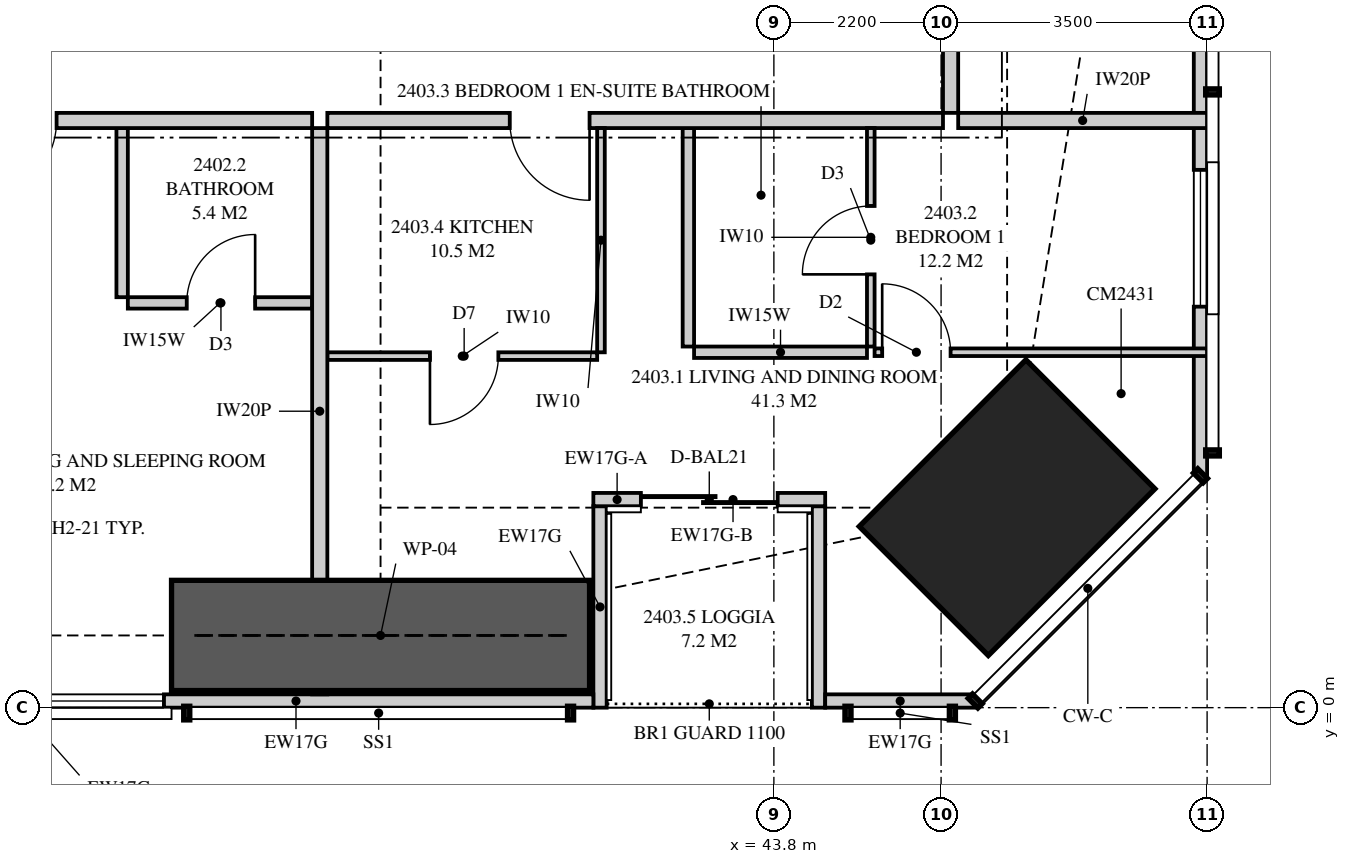
"""IFC4 building model, lengths in metres.
Left out: names, types, materials, properties, quantities, classifications, styles, units other than length and angle.
Written with IfcOpenShell. Run it as: python <this file> out.ifc"""

import sys

from ifc_helpers import new_model, si_unit, direction, frame, frame_2d, origin, origin_2d, place, context, subcontext, project, spatial, polyline, rectangle, outline, extrude, element, fill, save


model = new_model("IFC4")
c1 = context("Model", 3, precision=1e-05, world=origin(), true_north=direction((0.0, 1.0)))
c2 = subcontext(c1, "Body", "Model", "MODEL_VIEW")
j1 = project(units=[si_unit("LENGTHUNIT", "METRE"), si_unit("PLANEANGLEUNIT", "RADIAN")], contexts=[c1])
p1 = place(None, origin())
s1 = spatial("IfcSite", under=j1, at=p1, CompositionType="ELEMENT")
p2 = place(p1, origin())
s2 = spatial("IfcBuilding", under=s1, at=p2, CompositionType="ELEMENT")
p3 = place(p2, frame((0.0, 0.0, 91.45)))
s3 = spatial("IfcBuildingStorey", under=s2, at=p3, CompositionType="ELEMENT", Elevation=91.45)
p4 = place(p3, frame((46.869, 2.631, 0.0), z_axis=(0.0, 0.0, 1.0), x_axis=(-0.707106781187, 0.707106781187, 0.0)))
e1 = element("IfcColumn", 1, at=p4, inside=s3, PredefinedType="COLUMN", context=c2, shape_type="SweptSolid", body=[
    extrude(rectangle(XDim=2.4, YDim=3.1, at=origin_2d()), origin(), (0.0, 0.0, 1.0), 3.35),
])
p5 = place(p3, frame((33.6, 0.087, 0.0), z_axis=(0.0, 0.0, 1.0), x_axis=(1.0, 0.0, 0.0)))
e2 = element("IfcWall", 2, at=p5, inside=s3, PredefinedType="SOLIDWALL", context=c2, shape_type="SweptSolid", body=[
    extrude(outline(polyline([(0.0, 0.0), (7.825, 0.0), (7.825, 3.11), (5.228, 3.11), (5.228, 2.15), (5.183, 2.15), (5.183, 3.11), (5.025, 3.11), (5.025, 2.15), (0.0, 2.15), (0.0, 0.0)])), frame((0.0, 0.087, 0.0), z_axis=(0.0, -1.0, 0.0), x_axis=(1.0, 0.0, 0.0)), (0.0, 0.0, 1.0), 0.175),
])
p6 = place(p5, frame((0.375, 0.0, 0.4)))
e3 = element("IfcOpeningElement", 3, at=p6, cuts=e2, PredefinedType="OPENING", context=c2, shape_type="SweptSolid", body=[
    extrude(rectangle(XDim=1.8, YDim=1.7, at=frame_2d((0.9, 0.85))), frame((0.0, 0.097, 0.0), z_axis=(0.0, -1.0, 0.0), x_axis=(1.0, 0.0, 0.0)), (0.0, 0.0, 1.0), 0.195),
])
p7 = place(p3, frame((44.475, 0.087, 0.0), z_axis=(0.0, 0.0, 1.0), x_axis=(1.0, 0.0, 0.0)))
e4 = element("IfcWall", 4, at=p7, inside=s3, PredefinedType="SOLIDWALL", context=c2, shape_type="SweptSolid", body=[
    extrude(rectangle(XDim=1.974, YDim=0.175, at=frame_2d((0.987, 0.0))), origin(), (0.0, 0.0, 1.0), 3.11),
])
p8 = place(p3, frame((41.425, 2.738, 0.0), z_axis=(0.0, 0.0, 1.0), x_axis=(1.0, 0.0, 0.0)))
e5 = element("IfcWall", 5, at=p8, inside=s3, PredefinedType="SOLIDWALL", context=c2, shape_type="SweptSolid", body=[
    extrude(rectangle(XDim=0.625, YDim=0.175, at=frame_2d((0.312, 0.0))), origin(), (0.0, 0.0, 1.0), 2.51),
])
p9 = place(p3, frame((42.05, 2.738, 0.0), z_axis=(0.0, 0.0, 1.0), x_axis=(1.0, 0.0, 0.0)))
e6 = element("IfcWall", 6, at=p9, inside=s3, PredefinedType="SOLIDWALL", context=c2, shape_type="SweptSolid", body=[
    extrude(rectangle(XDim=2.425, YDim=0.175, at=frame_2d((1.212, 0.0))), origin(), (0.0, 0.0, 1.0), 2.15),
])
p10 = place(p9, origin())
e7 = element("IfcOpeningElement", 7, at=p10, cuts=e6, PredefinedType="OPENING", context=c2, shape_type="SweptSolid", body=[
    extrude(rectangle(XDim=1.8, YDim=2.1, at=frame_2d((0.9, 1.05))), frame((0.0, 0.097, 0.0), z_axis=(0.0, -1.0, 0.0), x_axis=(1.0, 0.0, 0.0)), (0.0, 0.0, 1.0), 0.195),
])
p11 = place(p3, frame((41.512, 0.0, 0.0), z_axis=(0.0, 0.0, 1.0), x_axis=(0.0, 1.0, 0.0)))
e8 = element("IfcWall", 8, at=p11, inside=s3, PredefinedType="SOLIDWALL", context=c2, shape_type="SweptSolid", body=[
    extrude(outline(polyline([(0.0, 0.0), (2.65, 0.0), (2.65, 2.51), (2.373, 2.51), (2.373, 2.15), (0.705, 2.15), (0.705, 3.11), (0.0, 3.11), (0.0, 0.0)])), frame((0.0, 0.087, 0.0), z_axis=(0.0, -1.0, 0.0), x_axis=(1.0, 0.0, 0.0)), (0.0, 0.0, 1.0), 0.175),
])
p12 = place(p3, frame((44.387, 0.0, 0.0), z_axis=(0.0, 0.0, 1.0), x_axis=(0.0, 1.0, 0.0)))
e9 = element("IfcWall", 9, at=p12, inside=s3, PredefinedType="SOLIDWALL", context=c2, shape_type="SweptSolid", body=[
    extrude(outline(polyline([(0.0, 0.0), (2.65, 0.0), (2.65, 2.15), (1.291, 2.15), (1.291, 3.11), (0.0, 3.11), (0.0, 0.0)])), frame((0.0, 0.087, 0.0), z_axis=(0.0, -1.0, 0.0), x_axis=(1.0, 0.0, 0.0)), (0.0, 0.0, 1.0), 0.175),
])
p13 = place(p3, frame((49.413, 3.051, 0.0), z_axis=(0.0, 0.0, 1.0), x_axis=(0.0, 1.0, 0.0)))
e10 = element("IfcWall", 10, at=p13, inside=s3, PredefinedType="SOLIDWALL", context=c2, shape_type="SweptSolid", body=[
    extrude(outline(polyline([(0.0, 0.0), (31.897, 0.0), (31.897, 3.11), (22.167, 3.11), (22.167, 2.15), (22.074, 2.15), (22.074, 3.11), (21.949, 3.11), (21.949, 2.15), (9.949, 2.15), (9.949, 3.11), (9.823, 3.11), (9.823, 2.15), (9.73, 2.15), (9.73, 3.11), (0.0, 3.11), (0.0, 0.0)])), frame((0.0, 0.087, 0.0), z_axis=(0.0, -1.0, 0.0), x_axis=(1.0, 0.0, 0.0)), (0.0, 0.0, 1.0), 0.175),
])
p14 = place(p13, frame((2.224, 0.0, 0.4)))
e11 = element("IfcOpeningElement", 11, at=p14, cuts=e10, PredefinedType="OPENING", context=c2, shape_type="SweptSolid", body=[
    extrude(rectangle(XDim=1.8, YDim=1.7, at=frame_2d((0.9, 0.85))), frame((0.0, 0.097, 0.0), z_axis=(0.0, -1.0, 0.0), x_axis=(1.0, 0.0, 0.0)), (0.0, 0.0, 1.0), 0.195),
])
p15 = place(p13, frame((14.849, 0.0, 0.4)))
e12 = element("IfcOpeningElement", 12, at=p15, cuts=e10, PredefinedType="OPENING", context=c2, shape_type="SweptSolid", body=[
    extrude(rectangle(XDim=1.2, YDim=1.7, at=frame_2d((0.6, 0.85))), frame((0.0, 0.097, 0.0), z_axis=(0.0, -1.0, 0.0), x_axis=(1.0, 0.0, 0.0)), (0.0, 0.0, 1.0), 0.195),
])
p16 = place(p13, frame((27.373, 0.0, 0.4)))
e13 = element("IfcOpeningElement", 13, at=p16, cuts=e10, PredefinedType="OPENING", context=c2, shape_type="SweptSolid", body=[
    extrude(rectangle(XDim=1.8, YDim=1.7, at=frame_2d((0.9, 0.85))), frame((0.0, 0.097, 0.0), z_axis=(0.0, -1.0, 0.0), x_axis=(1.0, 0.0, 0.0)), (0.0, 0.0, 1.0), 0.195),
])
p17 = place(p3, frame((37.825, 0.175, 0.0), z_axis=(0.0, 0.0, 1.0), x_axis=(0.0, 1.0, 0.0)))
e14 = element("IfcWall", 14, at=p17, inside=s3, PredefinedType="PARTITIONING", context=c2, shape_type="SweptSolid", body=[
    extrude(outline(polyline([(0.529, 2.15), (0.0, 2.15), (0.0, 0.0), (0.529, 0.0), (0.529, 0.957), (1.021, 0.957), (1.021, 0.0), (7.45, 0.0), (7.45, 3.11), (1.685, 3.11), (1.685, 2.15), (1.021, 2.15), (1.021, 1.193), (0.529, 1.193), (0.529, 2.15)])), frame((0.0, 0.1, 0.0), z_axis=(0.0, -1.0, 0.0), x_axis=(1.0, 0.0, 0.0)), (0.0, 0.0, 1.0), 0.2),
])
p18 = place(p3, frame((29.9, 7.725, 0.0), z_axis=(0.0, 0.0, 1.0), x_axis=(1.0, 0.0, 0.0)))
e15 = element("IfcWall", 15, at=p18, inside=s3, PredefinedType="PARTITIONING", context=c2, shape_type="SweptSolid", body=[
    extrude(rectangle(XDim=7.825, YDim=0.2, at=frame_2d((3.913, 0.0))), origin(), (0.0, 0.0, 1.0), 3.11),
])
p19 = place(p18, frame((3.413, 0.0, 0.0)))
e16 = element("IfcOpeningElement", 16, at=p19, cuts=e15, PredefinedType="OPENING", context=c2, shape_type="SweptSolid", body=[
    extrude(rectangle(XDim=1.05, YDim=2.2, at=frame_2d((0.525, 1.1))), frame((0.0, 0.11, 0.0), z_axis=(0.0, -1.0, 0.0), x_axis=(1.0, 0.0, 0.0)), (0.0, 0.0, 1.0), 0.22),
])
p20 = place(p3, frame((35.3, 5.325, 0.0), z_axis=(0.0, 0.0, 1.0), x_axis=(1.0, 0.0, 0.0)))
e17 = element("IfcWall", 17, at=p20, inside=s3, PredefinedType="PLUMBINGWALL", context=c2, shape_type="SweptSolid", body=[
    extrude(rectangle(XDim=2.425, YDim=0.15, at=frame_2d((1.212, 0.0))), origin(), (0.0, 0.0, 1.0), 3.11),
])
p21 = place(p20, frame((0.775, 0.0, 0.0)))
e18 = element("IfcOpeningElement", 18, at=p21, cuts=e17, PredefinedType="OPENING", context=c2, shape_type="SweptSolid", body=[
    extrude(rectangle(XDim=0.9, YDim=2.1, at=frame_2d((0.45, 1.05))), frame((0.0, 0.085, 0.0), z_axis=(0.0, -1.0, 0.0), x_axis=(1.0, 0.0, 0.0)), (0.0, 0.0, 1.0), 0.17),
])
p22 = place(p3, frame((35.225, 5.4, 0.0), z_axis=(0.0, 0.0, 1.0), x_axis=(0.0, 1.0, 0.0)))
e19 = element("IfcWall", 19, at=p22, inside=s3, PredefinedType="PLUMBINGWALL", context=c2, shape_type="SweptSolid", body=[
    extrude(rectangle(XDim=2.225, YDim=0.15, at=frame_2d((1.113, 0.0))), origin(), (0.0, 0.0, 1.0), 3.11),
])
p23 = place(p3, frame((37.925, 7.725, 0.0), z_axis=(0.0, 0.0, 1.0), x_axis=(1.0, 0.0, 0.0)))
e20 = element("IfcWall", 20, at=p23, inside=s3, PredefinedType="PARTITIONING", context=c2, shape_type="SweptSolid", body=[
    extrude(outline(polyline([(0.0, 0.0), (8.1, 0.0), (8.1, 3.11), (1.037, 3.11), (1.037, 2.541), (0.363, 2.541), (0.363, 3.11), (0.0, 3.11), (0.0, 0.0)])), frame((0.0, 0.1, 0.0), z_axis=(0.0, -1.0, 0.0), x_axis=(1.0, 0.0, 0.0)), (0.0, 0.0, 1.0), 0.2),
])
p24 = place(p23, frame((2.4, 0.0, 0.0)))
e21 = element("IfcOpeningElement", 21, at=p24, cuts=e20, PredefinedType="OPENING", context=c2, shape_type="SweptSolid", body=[
    extrude(rectangle(XDim=1.05, YDim=2.2, at=frame_2d((0.525, 1.1))), frame((0.0, 0.11, 0.0), z_axis=(0.0, -1.0, 0.0), x_axis=(1.0, 0.0, 0.0)), (0.0, 0.0, 1.0), 0.22),
])
p25 = place(p3, frame((45.075, 4.751, 0.0), z_axis=(0.0, 0.0, 1.0), x_axis=(0.0, 1.0, 0.0)))
e22 = element("IfcWall", 22, at=p25, inside=s3, PredefinedType="PARTITIONING", context=c2, shape_type="SweptSolid", body=[
    extrude(rectangle(XDim=2.874, YDim=0.1, at=frame_2d((1.437, 0.0))), origin(), (0.0, 0.0, 1.0), 3.11),
])
p26 = place(p25, frame((0.949, 0.0, 0.0)))
e23 = element("IfcOpeningElement", 23, at=p26, cuts=e22, PredefinedType="OPENING", context=c2, shape_type="SweptSolid", body=[
    extrude(rectangle(XDim=0.9, YDim=2.1, at=frame_2d((0.45, 1.05))), frame((0.0, 0.06, 0.0), z_axis=(0.0, -1.0, 0.0), x_axis=(1.0, 0.0, 0.0)), (0.0, 0.0, 1.0), 0.12),
])
p27 = place(p3, frame((45.125, 4.676, 0.0), z_axis=(0.0, 0.0, 1.0), x_axis=(1.0, 0.0, 0.0)))
e24 = element("IfcWall", 24, at=p27, inside=s3, PredefinedType="PARTITIONING", context=c2, shape_type="SweptSolid", body=[
    extrude(outline(polyline([(0.0, 0.0), (4.375, 0.0), (4.375, 3.11), (2.946, 3.11), (2.946, 2.15), (1.204, 2.15), (1.204, 3.11), (0.0, 3.11), (0.0, 0.0)])), frame((0.0, 0.05, 0.0), z_axis=(0.0, -1.0, 0.0), x_axis=(1.0, 0.0, 0.0)), (0.0, 0.0, 1.0), 0.1),
])
p28 = place(p27, frame((0.1, 0.0, 0.0)))
e25 = element("IfcOpeningElement", 25, at=p28, cuts=e24, PredefinedType="OPENING", context=c2, shape_type="SweptSolid", body=[
    extrude(rectangle(XDim=0.9, YDim=2.1, at=frame_2d((0.45, 1.05))), frame((0.0, 0.06, 0.0), z_axis=(0.0, -1.0, 0.0), x_axis=(1.0, 0.0, 0.0)), (0.0, 0.0, 1.0), 0.12),
])
p29 = place(p3, frame((42.75, 4.676, 0.0), z_axis=(0.0, 0.0, 1.0), x_axis=(1.0, 0.0, 0.0)))
e26 = element("IfcWall", 26, at=p29, inside=s3, PredefinedType="PLUMBINGWALL", context=c2, shape_type="SweptSolid", body=[
    extrude(rectangle(XDim=2.275, YDim=0.15, at=frame_2d((1.137, 0.0))), origin(), (0.0, 0.0, 1.0), 3.11),
])
p30 = place(p3, frame((42.675, 4.751, 0.0), z_axis=(0.0, 0.0, 1.0), x_axis=(0.0, 1.0, 0.0)))
e27 = element("IfcWall", 27, at=p30, inside=s3, PredefinedType="PLUMBINGWALL", context=c2, shape_type="SweptSolid", body=[
    extrude(rectangle(XDim=2.874, YDim=0.15, at=frame_2d((1.437, 0.0))), origin(), (0.0, 0.0, 1.0), 3.11),
])
p31 = place(p3, frame((37.925, 4.625, 0.0), z_axis=(0.0, 0.0, 1.0), x_axis=(1.0, 0.0, 0.0)))
e28 = element("IfcWall", 28, at=p31, inside=s3, PredefinedType="PARTITIONING", context=c2, shape_type="SweptSolid", body=[
    extrude(outline(polyline([(0.0, 0.0), (3.55, 0.0), (3.55, 3.11), (0.987, 3.11), (0.987, 2.541), (0.413, 2.541), (0.413, 3.11), (0.0, 3.11), (0.0, 0.0)])), frame((0.0, 0.05, 0.0), z_axis=(0.0, -1.0, 0.0), x_axis=(1.0, 0.0, 0.0)), (0.0, 0.0, 1.0), 0.1),
])
p32 = place(p31, frame((1.35, 0.0, 0.0)))
e29 = element("IfcOpeningElement", 29, at=p32, cuts=e28, PredefinedType="OPENING", context=c2, shape_type="SweptSolid", body=[
    extrude(rectangle(XDim=0.9, YDim=2.1, at=frame_2d((0.45, 1.05))), frame((0.0, 0.06, 0.0), z_axis=(0.0, -1.0, 0.0), x_axis=(1.0, 0.0, 0.0)), (0.0, 0.0, 1.0), 0.12),
])
p33 = place(p3, frame((41.525, 4.675, 0.0), z_axis=(0.0, 0.0, 1.0), x_axis=(0.0, 1.0, 0.0)))
e30 = element("IfcWall", 30, at=p33, inside=s3, PredefinedType="PARTITIONING", context=c2, shape_type="SweptSolid", body=[
    extrude(rectangle(XDim=2.95, YDim=0.1, at=frame_2d((1.475, 0.0))), origin(), (0.0, 0.0, 1.0), 3.11),
])
p34 = place(p3, frame((46.225, 7.725, 0.0), z_axis=(0.0, 0.0, 1.0), x_axis=(1.0, 0.0, 0.0)))
e31 = element("IfcWall", 31, at=p34, inside=s3, PredefinedType="PARTITIONING", context=c2, shape_type="SweptSolid", body=[
    extrude(outline(polyline([(0.0, 0.0), (3.275, 0.0), (3.275, 3.11), (2.392, 3.11), (2.392, 2.15), (0.643, 2.15), (0.643, 2.541), (0.306, 2.541), (0.306, 3.11), (0.0, 3.11), (0.0, 0.0)])), frame((0.0, 0.1, 0.0), z_axis=(0.0, -1.0, 0.0), x_axis=(1.0, 0.0, 0.0)), (0.0, 0.0, 1.0), 0.2),
])
p35 = place(p3, frame((46.125, 7.825, 0.0), z_axis=(0.0, 0.0, 1.0), x_axis=(0.0, 1.0, 0.0)))
e32 = element("IfcWall", 32, at=p35, inside=s3, PredefinedType="PARTITIONING", context=c2, shape_type="SweptSolid", body=[
    extrude(outline(polyline([(0.0, 0.0), (8.475, 0.0), (8.475, 3.11), (5.512, 3.11), (5.512, 2.541), (4.838, 2.541), (4.838, 3.11), (0.0, 3.11), (0.0, 0.0)])), frame((0.0, 0.1, 0.0), z_axis=(0.0, -1.0, 0.0), x_axis=(1.0, 0.0, 0.0)), (0.0, 0.0, 1.0), 0.2),
])
p36 = place(p3, frame((35.875, 0.95, 0.0), z_axis=(0.0, 0.0, 1.0), x_axis=(1.0, 0.0, 0.0)))
e33 = element("IfcWall", 33, at=p36, inside=s3, PredefinedType="SHEAR", context=c2, shape_type="SweptSolid", body=[
    extrude(rectangle(XDim=5.5, YDim=1.45, at=frame_2d((2.75, 0.0))), origin(), (0.0, 0.0, 1.0), 3.35),
])
p37 = place(p6, origin())
e34 = element("IfcWindow", 34, at=p37, inside=s3, PartitioningType="SINGLE_PANEL", PredefinedType="WINDOW", context=c2, shape_type="SweptSolid", body=[
    extrude(rectangle(XDim=1.8, YDim=1.7, at=frame_2d((0.9, 0.85))), frame((0.0, 0.03, 0.0), z_axis=(0.0, -1.0, 0.0), x_axis=(1.0, 0.0, 0.0)), (0.0, 0.0, 1.0), 0.06),
])
fill(e3, e34)
p38 = place(p10, origin())
e35 = element("IfcDoor", 35, at=p38, inside=s3, OperationType="SLIDING_TO_LEFT", PredefinedType="DOOR", context=c2, shape_type="SweptSolid", body=[
    extrude(rectangle(XDim=1.8, YDim=2.1, at=frame_2d((0.9, 1.05))), frame((0.0, 0.025, 0.0), z_axis=(0.0, -1.0, 0.0), x_axis=(1.0, 0.0, 0.0)), (0.0, 0.0, 1.0), 0.05),
])
fill(e7, e35)
p39 = place(p14, origin())
e36 = element("IfcWindow", 36, at=p39, inside=s3, PartitioningType="SINGLE_PANEL", PredefinedType="WINDOW", context=c2, shape_type="SweptSolid", body=[
    extrude(rectangle(XDim=1.8, YDim=1.7, at=frame_2d((0.9, 0.85))), frame((0.0, 0.03, 0.0), z_axis=(0.0, -1.0, 0.0), x_axis=(1.0, 0.0, 0.0)), (0.0, 0.0, 1.0), 0.06),
])
fill(e11, e36)
p40 = place(p19, frame((1.05, 0.0, 0.0), z_axis=(0.0, 0.0, 1.0), x_axis=(-1.0, 0.0, 0.0)))
e37 = element("IfcDoor", 37, at=p40, inside=s3, OperationType="SINGLE_SWING_RIGHT", PredefinedType="DOOR", context=c2, shape_type="SweptSolid", body=[
    extrude(rectangle(XDim=1.05, YDim=2.2, at=frame_2d((0.525, 1.1))), frame((0.0, 0.025, 0.0), z_axis=(0.0, -1.0, 0.0), x_axis=(1.0, 0.0, 0.0)), (0.0, 0.0, 1.0), 0.05),
])
fill(e16, e37)
p41 = place(p21, origin())
e38 = element("IfcDoor", 38, at=p41, inside=s3, OperationType="SINGLE_SWING_RIGHT", PredefinedType="DOOR", context=c2, shape_type="SweptSolid", body=[
    extrude(rectangle(XDim=0.9, YDim=2.1, at=frame_2d((0.45, 1.05))), frame((0.0, 0.025, 0.0), z_axis=(0.0, -1.0, 0.0), x_axis=(1.0, 0.0, 0.0)), (0.0, 0.0, 1.0), 0.05),
])
fill(e18, e38)
p42 = place(p24, frame((1.05, 0.0, 0.0), z_axis=(0.0, 0.0, 1.0), x_axis=(-1.0, 0.0, 0.0)))
e39 = element("IfcDoor", 39, at=p42, inside=s3, OperationType="SINGLE_SWING_LEFT", PredefinedType="DOOR", context=c2, shape_type="SweptSolid", body=[
    extrude(rectangle(XDim=1.05, YDim=2.2, at=frame_2d((0.525, 1.1))), frame((0.0, 0.025, 0.0), z_axis=(0.0, -1.0, 0.0), x_axis=(1.0, 0.0, 0.0)), (0.0, 0.0, 1.0), 0.05),
])
fill(e21, e39)
p43 = place(p28, origin())
e40 = element("IfcDoor", 40, at=p43, inside=s3, OperationType="SINGLE_SWING_LEFT", PredefinedType="DOOR", context=c2, shape_type="SweptSolid", body=[
    extrude(rectangle(XDim=0.9, YDim=2.1, at=frame_2d((0.45, 1.05))), frame((0.0, 0.025, 0.0), z_axis=(0.0, -1.0, 0.0), x_axis=(1.0, 0.0, 0.0)), (0.0, 0.0, 1.0), 0.05),
])
fill(e25, e40)
p44 = place(p26, origin())
e41 = element("IfcDoor", 41, at=p44, inside=s3, OperationType="SINGLE_SWING_LEFT", PredefinedType="DOOR", context=c2, shape_type="SweptSolid", body=[
    extrude(rectangle(XDim=0.9, YDim=2.1, at=frame_2d((0.45, 1.05))), frame((0.0, 0.025, 0.0), z_axis=(0.0, -1.0, 0.0), x_axis=(1.0, 0.0, 0.0)), (0.0, 0.0, 1.0), 0.05),
])
fill(e23, e41)
p45 = place(p32, frame((0.9, 0.0, 0.0), z_axis=(0.0, 0.0, 1.0), x_axis=(-1.0, 0.0, 0.0)))
e42 = element("IfcDoor", 42, at=p45, inside=s3, OperationType="SINGLE_SWING_RIGHT", PredefinedType="DOOR", context=c2, shape_type="SweptSolid", body=[
    extrude(rectangle(XDim=0.9, YDim=2.1, at=frame_2d((0.45, 1.05))), frame((0.0, 0.025, 0.0), z_axis=(0.0, -1.0, 0.0), x_axis=(1.0, 0.0, 0.0)), (0.0, 0.0, 1.0), 0.05),
])
fill(e29, e42)
save(model, sys.argv[1])
